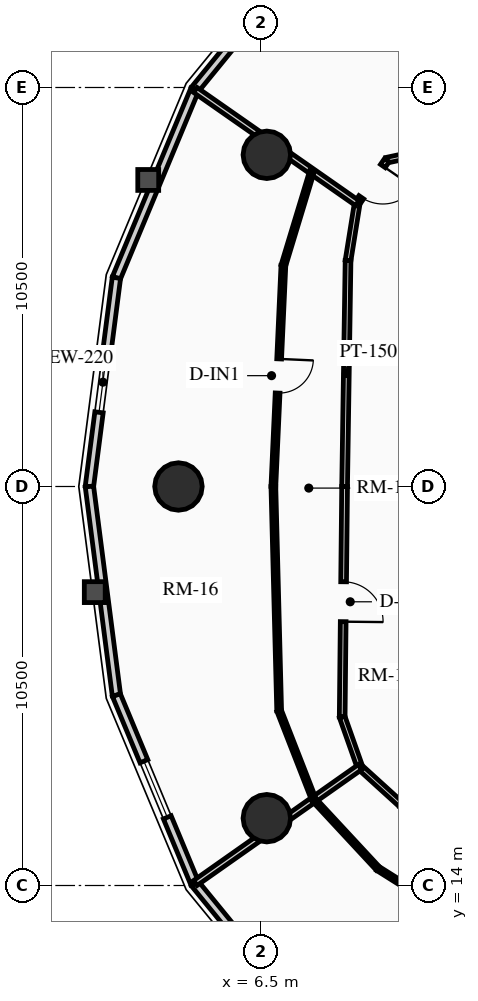
"""IFC4 building model, lengths in metres.
Left out: names, types, materials, properties, quantities, classifications, styles, units other than length and angle.
Written with IfcOpenShell. Run it as: python <this file> out.ifc"""

import sys

from ifc_helpers import new_model, si_unit, direction, frame, frame_2d, origin, origin_2d, place, context, subcontext, project, spatial, rectangle, circle, extrude, source, transform, mapped, element, fill, save


model = new_model("IFC4")
c1 = context("Model", 3, precision=1e-05, world=origin(), true_north=direction((0.0, 1.0)))
c2 = subcontext(c1, "Body", "Model", "MODEL_VIEW")
j1 = project(units=[si_unit("LENGTHUNIT", "METRE"), si_unit("PLANEANGLEUNIT", "RADIAN")], contexts=[c1])
p1 = place(None, origin())
s1 = spatial("IfcSite", under=j1, at=p1, CompositionType="ELEMENT")
p2 = place(p1, origin())
s2 = spatial("IfcBuilding", under=s1, at=p2, CompositionType="ELEMENT")
p3 = place(p2, frame((0.0, 0.0, 163.24)))
s3 = spatial("IfcBuildingStorey", under=s2, at=p3, CompositionType="ELEMENT", Elevation=163.24)
for number, where, z_axis, x_axis in (
    (1, (6.653, 33.229, 0.0), (0.0, 0.0, 1.0), (1.0, 0.0, 0.0)),
    (2, (4.328, 24.5, 0.0), (0.0, 0.0, 1.0), (1.0, 0.0, 0.0)),
    (3, (6.653, 15.771, 0.0), (0.0, 0.0, 1.0), (1.0, 0.0, 0.0)),
):
    element("IfcColumn", number, at=place(p3, frame(where, z_axis=z_axis, x_axis=x_axis)), inside=s3, PredefinedType="USERDEFINED", context=c2, shape_type="SweptSolid", body=[
        extrude(circle(Radius=0.625, at=origin_2d()), origin(), (0.0, 0.0, 1.0), 2.91),
    ])
p4 = place(p3, frame((4.757, 34.945, 0.0), z_axis=(0.0, 0.0, 1.0), x_axis=(0.632598524901, 0.774479894053, 0.0)))
e4 = element("IfcWall", 4, at=p4, inside=s3, PredefinedType="SOLIDWALL", context=c2, shape_type="SweptSolid", body=[
    extrude(rectangle(XDim=5.076, YDim=0.22, at=frame_2d((2.538, 0.0))), origin(), (0.0, 0.0, 1.0), 2.245),
])
m1 = source(origin(), c2, "Body", "SweptSolid", [
    extrude(rectangle(XDim=1.6, YDim=1.3, at=frame_2d((0.8, 0.65))), frame((0.0, 0.12, 0.0), z_axis=(0.0, -1.0, 0.0), x_axis=(1.0, 0.0, 0.0)), (0.0, 0.0, 1.0), 0.24),
])
p5 = place(p4, frame((1.738, 0.0, 0.65)))
e5 = element("IfcOpeningElement", 5, at=p5, cuts=e4, PredefinedType="OPENING", context=c2, shape_type="MappedRepresentation", body=[
    mapped(m1, transform((0.0, 0.0, 0.0), x_axis=(1.0, 0.0, 0.0), y_axis=(0.0, 1.0, 0.0), z_axis=(0.0, 0.0, 1.0), scale=1.0)),
])
p6 = place(p3, frame((2.695, 29.991, 0.0), z_axis=(0.0, 0.0, 1.0), x_axis=(0.384259959969, 0.923224936386, 0.0)))
e6 = element("IfcWall", 6, at=p6, inside=s3, PredefinedType="SOLIDWALL", context=c2, shape_type="SweptSolid", body=[
    extrude(rectangle(XDim=5.365, YDim=0.22, at=frame_2d((2.683, 0.0))), origin(), (0.0, 0.0, 1.0), 2.245),
])
p7 = place(p3, frame((1.985, 24.5, 0.0), z_axis=(0.0, 0.0, 1.0), x_axis=(0.128266533912, 0.991739732126, 0.0)))
e7 = element("IfcWall", 7, at=p7, inside=s3, PredefinedType="SOLIDWALL", context=c2, shape_type="SweptSolid", body=[
    extrude(rectangle(XDim=5.537, YDim=0.22, at=frame_2d((2.769, 0.0))), origin(), (0.0, 0.0, 1.0), 2.245),
])
p8 = place(p7, frame((1.968, 0.0, 0.65)))
e8 = element("IfcOpeningElement", 8, at=p8, cuts=e7, PredefinedType="OPENING", context=c2, shape_type="MappedRepresentation", body=[
    mapped(m1, transform((0.0, 0.0, 0.0), x_axis=(1.0, 0.0, 0.0), y_axis=(0.0, 1.0, 0.0), z_axis=(0.0, 0.0, 1.0), scale=1.0)),
])
p9 = place(p3, frame((2.695, 19.009, 0.0), z_axis=(0.0, 0.0, 1.0), x_axis=(-0.128266533912, 0.991739732126, 0.0)))
e9 = element("IfcWall", 9, at=p9, inside=s3, PredefinedType="SOLIDWALL", context=c2, shape_type="SweptSolid", body=[
    extrude(rectangle(XDim=5.537, YDim=0.22, at=frame_2d((2.769, 0.0))), origin(), (0.0, 0.0, 1.0), 2.245),
])
p10 = place(p3, frame((4.757, 14.055, 0.0), z_axis=(0.0, 0.0, 1.0), x_axis=(-0.384259959969, 0.923224936386, 0.0)))
e10 = element("IfcWall", 10, at=p10, inside=s3, PredefinedType="SOLIDWALL", context=c2, shape_type="SweptSolid", body=[
    extrude(rectangle(XDim=5.365, YDim=0.22, at=frame_2d((2.683, 0.0))), origin(), (0.0, 0.0, 1.0), 2.245),
])
p11 = place(p10, frame((1.883, 0.0, 0.65)))
e11 = element("IfcOpeningElement", 11, at=p11, cuts=e10, PredefinedType="OPENING", context=c2, shape_type="MappedRepresentation", body=[
    mapped(m1, transform((0.0, 0.0, 0.0), x_axis=(1.0, 0.0, 0.0), y_axis=(0.0, 1.0, 0.0), z_axis=(0.0, 0.0, 1.0), scale=1.0)),
])
p12 = place(p3, frame((7.968, 10.124, 0.0), z_axis=(0.0, 0.0, 1.0), x_axis=(-0.632598524901, 0.774479894053, 0.0)))
e12 = element("IfcWall", 12, at=p12, inside=s3, PredefinedType="SOLIDWALL", context=c2, shape_type="SweptSolid", body=[
    extrude(rectangle(XDim=5.076, YDim=0.22, at=frame_2d((2.538, 0.0))), origin(), (0.0, 0.0, 1.0), 2.245),
])
p13 = place(p3, frame((11.681, 33.49, 0.0), z_axis=(0.0, 0.0, 1.0), x_axis=(-0.977628265995, -0.2103401377, 0.0)))
e13 = element("IfcWall", 13, at=p13, inside=s3, PredefinedType="PARTITIONING", context=c2, shape_type="SweptSolid", body=[
    extrude(rectangle(XDim=1.912, YDim=0.15, at=frame_2d((0.956, 0.0))), origin(), (0.0, 0.0, 1.0), 2.245),
])
p14 = place(p3, frame((9.812, 33.087, 0.0), z_axis=(0.0, 0.0, 1.0), x_axis=(-0.567811958729, -0.823158295545, 0.0)))
e14 = element("IfcWall", 14, at=p14, inside=s3, PredefinedType="PARTITIONING", context=c2, shape_type="SweptSolid", body=[
    extrude(rectangle(XDim=1.372, YDim=0.15, at=frame_2d((0.686, 0.0))), origin(), (0.0, 0.0, 1.0), 2.245),
])
m2 = source(origin(), c2, "Body", "SweptSolid", [
    extrude(rectangle(XDim=1.0, YDim=2.015, at=frame_2d((0.5, 1.007))), frame((0.0, 0.085, 0.0), z_axis=(0.0, -1.0, 0.0), x_axis=(1.0, 0.0, 0.0)), (0.0, 0.0, 1.0), 0.17),
])
p15 = place(p14, frame((0.186, 0.0, 0.0)))
e15 = element("IfcOpeningElement", 15, at=p15, cuts=e14, PredefinedType="OPENING", context=c2, shape_type="MappedRepresentation", body=[
    mapped(m2, transform((0.0, 0.0, 0.0), x_axis=(1.0, 0.0, 0.0), y_axis=(0.0, 1.0, 0.0), z_axis=(0.0, 0.0, 1.0), scale=1.0)),
])
p16 = place(p3, frame((9.033, 31.958, 0.0), z_axis=(0.0, 0.0, 1.0), x_axis=(-0.158344987388, -0.98738384885, 0.0)))
e16 = element("IfcWall", 16, at=p16, inside=s3, PredefinedType="PARTITIONING", context=c2, shape_type="SweptSolid", body=[
    extrude(rectangle(XDim=1.531, YDim=0.15, at=frame_2d((0.766, 0.0))), origin(), (0.0, 0.0, 1.0), 2.245),
])
p17 = place(p3, frame((8.791, 30.446, 0.0), z_axis=(0.0, 0.0, 1.0), x_axis=(-0.015230619426, -0.999884007389, 0.0)))
e17 = element("IfcWall", 17, at=p17, inside=s3, PredefinedType="PARTITIONING", context=c2, shape_type="SweptSolid", body=[
    extrude(rectangle(XDim=5.947, YDim=0.15, at=frame_2d((2.974, 0.0))), origin(), (0.0, 0.0, 1.0), 2.675),
])
p18 = place(p3, frame((8.7, 24.5, 0.0), z_axis=(0.0, 0.0, 1.0), x_axis=(-0.010507512335, -0.999944794568, 0.0)))
e18 = element("IfcWall", 18, at=p18, inside=s3, PredefinedType="PARTITIONING", context=c2, shape_type="SweptSolid", body=[
    extrude(rectangle(XDim=6.064, YDim=0.15, at=frame_2d((3.032, 0.0))), origin(), (0.0, 0.0, 1.0), 2.245),
])
m3 = source(origin(), c2, "Body", "SweptSolid", [
    extrude(rectangle(XDim=1.05, YDim=2.015, at=frame_2d((0.525, 1.007))), frame((0.0, 0.085, 0.0), z_axis=(0.0, -1.0, 0.0), x_axis=(1.0, 0.0, 0.0)), (0.0, 0.0, 1.0), 0.17),
])
p19 = place(p18, frame((2.507, 0.0, 0.0)))
e19 = element("IfcOpeningElement", 19, at=p19, cuts=e18, PredefinedType="OPENING", context=c2, shape_type="MappedRepresentation", body=[
    mapped(m3, transform((0.0, 0.0, 0.0), x_axis=(1.0, 0.0, 0.0), y_axis=(0.0, 1.0, 0.0), z_axis=(0.0, 0.0, 1.0), scale=1.0)),
])
p20 = place(p3, frame((8.636, 18.436, 0.0), z_axis=(0.0, 0.0, 1.0), x_axis=(0.333211866524, -0.942851977782, 0.0)))
e20 = element("IfcWall", 20, at=p20, inside=s3, PredefinedType="PARTITIONING", context=c2, shape_type="SweptSolid", body=[
    extrude(rectangle(XDim=1.402, YDim=0.15, at=frame_2d((0.701, 0.0))), origin(), (0.0, 0.0, 1.0), 2.245),
])
p21 = place(p3, frame((9.103, 17.115, 0.0), z_axis=(0.0, 0.0, 1.0), x_axis=(0.740186897911, -0.672401186912, 0.0)))
e21 = element("IfcWall", 21, at=p21, inside=s3, PredefinedType="PARTITIONING", context=c2, shape_type="SweptSolid", body=[
    extrude(rectangle(XDim=1.477, YDim=0.15, at=frame_2d((0.738, 0.0))), origin(), (0.0, 0.0, 1.0), 2.245),
])
p22 = place(p3, frame((9.033, 31.958, 0.0), z_axis=(0.0, 0.0, 1.0), x_axis=(-0.819840720998, 0.572591645236, 0.0)))
e22 = element("IfcWall", 22, at=p22, inside=s3, PredefinedType="PARTITIONING", context=c2, shape_type="SweptSolid", body=[
    extrude(rectangle(XDim=5.196, YDim=0.16, at=frame_2d((2.598, 0.0))), origin(), (0.0, 0.0, 1.0), 2.245),
])
p23 = place(p3, frame((9.103, 17.115, 0.0), z_axis=(0.0, 0.0, 1.0), x_axis=(-0.817760605426, -0.575558504597, 0.0)))
e23 = element("IfcWall", 23, at=p23, inside=s3, PredefinedType="PARTITIONING", context=c2, shape_type="SweptSolid", body=[
    extrude(rectangle(XDim=5.295, YDim=0.16, at=frame_2d((2.647, 0.0))), origin(), (0.0, 0.0, 1.0), 2.245),
])
p24 = place(p3, frame((7.84, 32.791, 0.0), z_axis=(0.0, 0.0, 1.0), x_axis=(-0.290387415435, -0.956909164423, 0.0)))
e24 = element("IfcWall", 24, at=p24, inside=s3, PredefinedType="PARTITIONING", context=c2, shape_type="SweptSolid", body=[
    extrude(rectangle(XDim=2.585, YDim=0.125, at=frame_2d((1.292, 0.0))), origin(), (0.0, 0.0, 1.0), 2.245),
])
p25 = place(p3, frame((7.089, 30.317, 0.0), z_axis=(0.0, 0.0, 1.0), x_axis=(-0.045322079706, -0.998972426592, 0.0)))
e25 = element("IfcWall", 25, at=p25, inside=s3, PredefinedType="PARTITIONING", context=c2, shape_type="SweptSolid", body=[
    extrude(rectangle(XDim=5.823, YDim=0.125, at=frame_2d((2.912, 0.0))), origin(), (0.0, 0.0, 1.0), 2.675),
])
m4 = source(origin(), c2, "Body", "SweptSolid", [
    extrude(rectangle(XDim=0.9, YDim=2.005, at=frame_2d((0.45, 1.002))), frame((0.0, 0.073, 0.0), z_axis=(0.0, -1.0, 0.0), x_axis=(1.0, 0.0, 0.0)), (0.0, 0.0, 1.0), 0.145),
])
p26 = place(p25, frame((2.462, 0.0, 0.0)))
e26 = element("IfcOpeningElement", 26, at=p26, cuts=e25, PredefinedType="OPENING", context=c2, shape_type="MappedRepresentation", body=[
    mapped(m4, transform((0.0, 0.0, 0.0), x_axis=(1.0, 0.0, 0.0), y_axis=(0.0, 1.0, 0.0), z_axis=(0.0, 0.0, 1.0), scale=1.0)),
])
p27 = place(p3, frame((6.825, 24.5, 0.0), z_axis=(0.0, 0.0, 1.0), x_axis=(0.025845586866, -0.999665947024, 0.0)))
e27 = element("IfcWall", 27, at=p27, inside=s3, PredefinedType="PARTITIONING", context=c2, shape_type="SweptSolid", body=[
    extrude(rectangle(XDim=5.904, YDim=0.125, at=frame_2d((2.952, 0.0))), origin(), (0.0, 0.0, 1.0), 2.245),
])
p28 = place(p3, frame((6.978, 18.598, 0.0), z_axis=(0.0, 0.0, 1.0), x_axis=(0.363845250376, -0.931459410698, 0.0)))
e28 = element("IfcWall", 28, at=p28, inside=s3, PredefinedType="PARTITIONING", context=c2, shape_type="SweptSolid", body=[
    extrude(rectangle(XDim=2.509, YDim=0.125, at=frame_2d((1.254, 0.0))), origin(), (0.0, 0.0, 1.0), 2.245),
])
p29 = place(p3, frame((7.891, 16.261, 0.0), z_axis=(0.0, 0.0, 1.0), x_axis=(0.680443535441, -0.7328005152, 0.0)))
e29 = element("IfcWall", 29, at=p29, inside=s3, PredefinedType="PARTITIONING", context=c2, shape_type="SweptSolid", body=[
    extrude(rectangle(XDim=2.476, YDim=0.125, at=frame_2d((1.238, 0.0))), origin(), (0.0, 0.0, 1.0), 2.245),
])
p30 = place(p3, frame((9.576, 14.447, 0.0), z_axis=(0.0, 0.0, 1.0), x_axis=(0.845905204383, -0.53333327779, 0.0)))
e30 = element("IfcWall", 30, at=p30, inside=s3, PredefinedType="PARTITIONING", context=c2, shape_type="SweptSolid", body=[
    extrude(rectangle(XDim=2.465, YDim=0.125, at=frame_2d((1.232, 0.0))), origin(), (0.0, 0.0, 1.0), 2.245),
])
p31 = place(p30, frame((0.782, 0.0, 0.0)))
e31 = element("IfcOpeningElement", 31, at=p31, cuts=e30, PredefinedType="OPENING", context=c2, shape_type="MappedRepresentation", body=[
    mapped(m4, transform((0.0, 0.0, 0.0), x_axis=(1.0, 0.0, 0.0), y_axis=(0.0, 1.0, 0.0), z_axis=(0.0, 0.0, 1.0), scale=1.0)),
])
m5 = source(origin(), c2, "Body", "SweptSolid", [
    extrude(rectangle(XDim=1.6, YDim=1.3, at=frame_2d((0.8, 0.65))), frame((0.0, 0.03, 0.0), z_axis=(0.0, -1.0, 0.0), x_axis=(1.0, 0.0, 0.0)), (0.0, 0.0, 1.0), 0.06),
])
p32 = place(p8, origin())
e32 = element("IfcWindow", 32, at=p32, inside=s3, PartitioningType="SINGLE_PANEL", PredefinedType="WINDOW", context=c2, shape_type="MappedRepresentation", body=[
    mapped(m5, transform((0.0, 0.0, 0.0), x_axis=(1.0, 0.0, 0.0), y_axis=(0.0, 1.0, 0.0), z_axis=(0.0, 0.0, 1.0), scale=1.0)),
])
fill(e8, e32)
p33 = place(p11, origin())
e33 = element("IfcWindow", 33, at=p33, inside=s3, PartitioningType="SINGLE_PANEL", PredefinedType="WINDOW", context=c2, shape_type="MappedRepresentation", body=[
    mapped(m5, transform((0.0, 0.0, 0.0), x_axis=(1.0, 0.0, 0.0), y_axis=(0.0, 1.0, 0.0), z_axis=(0.0, 0.0, 1.0), scale=1.0)),
])
fill(e11, e33)
m6 = source(origin(), c2, "Body", "SweptSolid", [
    extrude(rectangle(XDim=1.0, YDim=2.015, at=frame_2d((0.5, 1.007))), frame((0.0, 0.025, 0.0), z_axis=(0.0, -1.0, 0.0), x_axis=(1.0, 0.0, 0.0)), (0.0, 0.0, 1.0), 0.05),
])
p34 = place(p15, origin())
e34 = element("IfcDoor", 34, at=p34, inside=s3, OperationType="SINGLE_SWING_LEFT", PredefinedType="DOOR", context=c2, shape_type="MappedRepresentation", body=[
    mapped(m6, transform((0.0, 0.0, 0.0), x_axis=(1.0, 0.0, 0.0), y_axis=(0.0, 1.0, 0.0), z_axis=(0.0, 0.0, 1.0), scale=1.0)),
])
fill(e15, e34)
m7 = source(origin(), c2, "Body", "SweptSolid", [
    extrude(rectangle(XDim=1.05, YDim=2.015, at=frame_2d((0.525, 1.007))), frame((0.0, 0.025, 0.0), z_axis=(0.0, -1.0, 0.0), x_axis=(1.0, 0.0, 0.0)), (0.0, 0.0, 1.0), 0.05),
])
p35 = place(p19, origin())
e35 = element("IfcDoor", 35, at=p35, inside=s3, OperationType="SINGLE_SWING_RIGHT", PredefinedType="DOOR", context=c2, shape_type="MappedRepresentation", body=[
    mapped(m7, transform((0.0, 0.0, 0.0), x_axis=(1.0, 0.0, 0.0), y_axis=(0.0, 1.0, 0.0), z_axis=(0.0, 0.0, 1.0), scale=1.0)),
])
fill(e19, e35)
m8 = source(origin(), c2, "Body", "SweptSolid", [
    extrude(rectangle(XDim=0.9, YDim=2.005, at=frame_2d((0.45, 1.002))), frame((0.0, 0.025, 0.0), z_axis=(0.0, -1.0, 0.0), x_axis=(1.0, 0.0, 0.0)), (0.0, 0.0, 1.0), 0.05),
])
p36 = place(p26, origin())
e36 = element("IfcDoor", 36, at=p36, inside=s3, OperationType="SINGLE_SWING_LEFT", PredefinedType="DOOR", context=c2, shape_type="MappedRepresentation", body=[
    mapped(m8, transform((0.0, 0.0, 0.0), x_axis=(1.0, 0.0, 0.0), y_axis=(0.0, 1.0, 0.0), z_axis=(0.0, 0.0, 1.0), scale=1.0)),
])
fill(e26, e36)
save(model, sys.argv[1])
